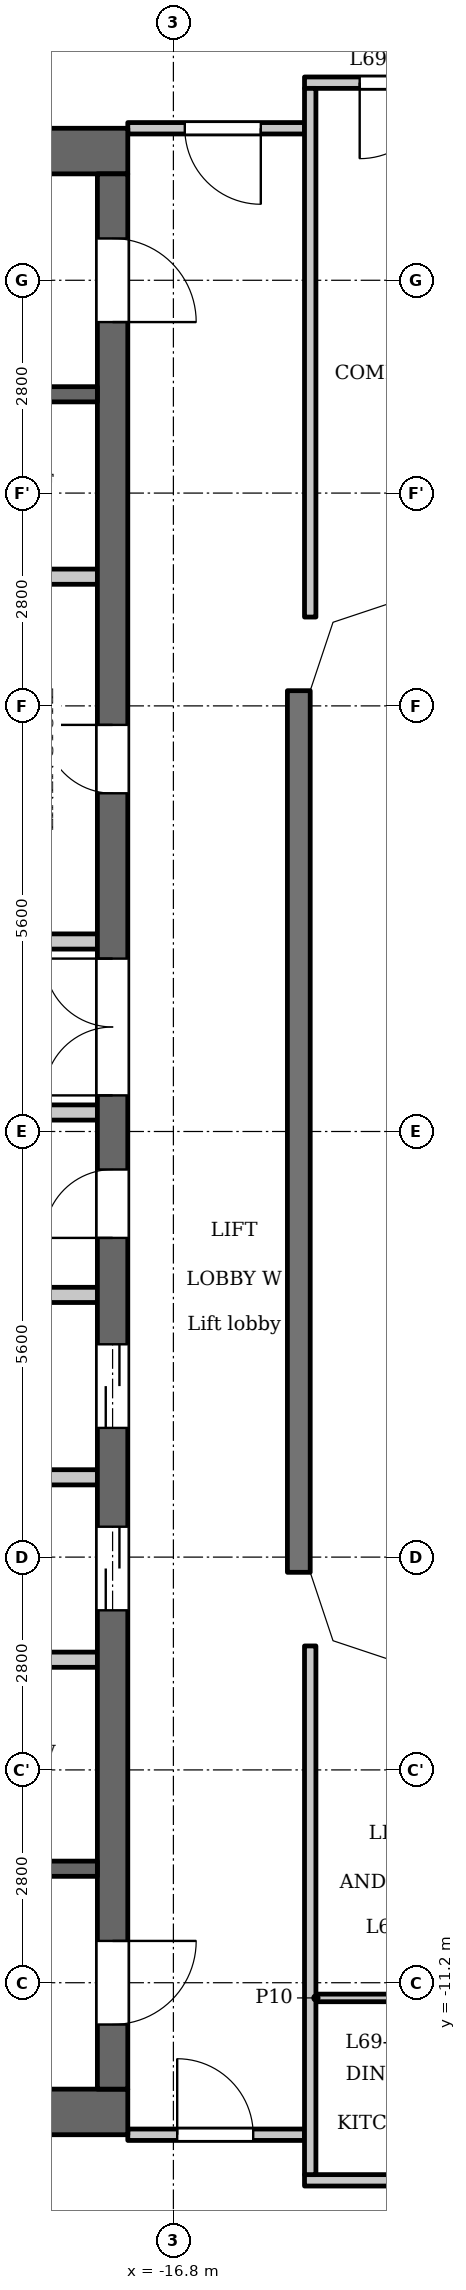
"""IFC4 building model, lengths in metres.
Left out: names, types, materials, properties, quantities, classifications, styles, units other than length and angle.
Written with IfcOpenShell. Run it as: python <this file> out.ifc"""

import sys

from ifc_helpers import new_model, si_unit, direction, frame, frame_2d, origin, place, context, subcontext, project, spatial, polyline, rectangle, outline, extrude, element, fill, save


model = new_model("IFC4")
c1 = context("Model", 3, precision=1e-05, world=origin(), true_north=direction((0.0, 1.0)))
c2 = subcontext(c1, "Body", "Model", "MODEL_VIEW")
j1 = project(units=[si_unit("LENGTHUNIT", "METRE"), si_unit("PLANEANGLEUNIT", "RADIAN")], contexts=[c1])
p1 = place(None, origin())
s1 = spatial("IfcSite", under=j1, at=p1, CompositionType="ELEMENT")
p2 = place(p1, origin())
s2 = spatial("IfcBuilding", under=s1, at=p2, CompositionType="ELEMENT")
p3 = place(p2, frame((0.0, 0.0, 266.2)))
s3 = spatial("IfcBuildingStorey", under=s2, at=p3, CompositionType="ELEMENT", Elevation=266.2)
p4 = place(p3, frame((-15.15, -5.8, 0.0), z_axis=(0.0, 0.0, 1.0), x_axis=(0.0, 1.0, 0.0)))
e1 = element("IfcWall", 1, at=p4, inside=s3, PredefinedType="SOLIDWALL", context=c2, shape_type="SweptSolid", body=[
    extrude(rectangle(XDim=11.6, YDim=0.3, at=frame_2d((5.8, 0.0))), origin(), (0.0, 0.0, 1.0), 3.2),
])
for number, where, z_axis, x_axis in (
    (2, (-17.4, 12.9, 0.0), (0.0, 0.0, 1.0), (-1.0, 0.0, 0.0)),
    (3, (-17.4, -12.9, 0.0), (0.0, 0.0, 1.0), (-1.0, 0.0, 0.0)),
):
    element("IfcWall", number, at=place(p3, frame(where, z_axis=z_axis, x_axis=x_axis)), inside=s3, PredefinedType="SHEAR", context=c2, shape_type="SweptSolid", body=[
        extrude(rectangle(XDim=7.32, YDim=0.6, at=frame_2d((3.66, 0.0))), origin(), (0.0, 0.0, 1.0), 3.2),
    ])
p5 = place(p3, frame((-17.6, -12.6, 0.0), z_axis=(0.0, 0.0, 1.0), x_axis=(0.0, 1.0, 0.0)))
e4 = element("IfcWall", 4, at=p5, inside=s3, PredefinedType="SHEAR", context=c2, shape_type="SweptSolid", body=[
    extrude(rectangle(XDim=25.2, YDim=0.4, at=frame_2d((12.6, 0.0))), origin(), (0.0, 0.0, 1.0), 3.2),
])
p6 = place(p5, frame((6.3, 0.0, 0.0)))
e5 = element("IfcOpeningElement", 5, at=p6, cuts=e4, PredefinedType="OPENING", context=c2, shape_type="SweptSolid", body=[
    extrude(rectangle(XDim=1.1, YDim=2.1, at=frame_2d((0.55, 1.05))), frame((0.0, 0.21, 0.0), z_axis=(0.0, -1.0, 0.0), x_axis=(1.0, 0.0, 0.0)), (0.0, 0.0, 1.0), 0.42),
])
p7 = place(p5, frame((8.7, 0.0, 0.0)))
e6 = element("IfcOpeningElement", 6, at=p7, cuts=e4, PredefinedType="OPENING", context=c2, shape_type="SweptSolid", body=[
    extrude(rectangle(XDim=1.1, YDim=2.1, at=frame_2d((0.55, 1.05))), frame((0.0, 0.21, 0.0), z_axis=(0.0, -1.0, 0.0), x_axis=(1.0, 0.0, 0.0)), (0.0, 0.0, 1.0), 0.42),
])
p8 = place(p5, frame((11.2, 0.0, 0.0)))
e7 = element("IfcOpeningElement", 7, at=p8, cuts=e4, PredefinedType="OPENING", context=c2, shape_type="SweptSolid", body=[
    extrude(rectangle(XDim=0.9, YDim=2.1, at=frame_2d((0.45, 1.05))), frame((0.0, 0.21, 0.0), z_axis=(0.0, -1.0, 0.0), x_axis=(1.0, 0.0, 0.0)), (0.0, 0.0, 1.0), 0.42),
])
p9 = place(p5, frame((17.05, 0.0, 0.0)))
e8 = element("IfcOpeningElement", 8, at=p9, cuts=e4, PredefinedType="OPENING", context=c2, shape_type="SweptSolid", body=[
    extrude(rectangle(XDim=0.9, YDim=2.1, at=frame_2d((0.45, 1.05))), frame((0.0, 0.21, 0.0), z_axis=(0.0, -1.0, 0.0), x_axis=(1.0, 0.0, 0.0)), (0.0, 0.0, 1.0), 0.42),
])
p10 = place(p5, frame((23.25, 0.0, 0.0)))
e9 = element("IfcOpeningElement", 9, at=p10, cuts=e4, PredefinedType="OPENING", context=c2, shape_type="SweptSolid", body=[
    extrude(rectangle(XDim=1.1, YDim=2.1, at=frame_2d((0.55, 1.05))), frame((0.0, 0.21, 0.0), z_axis=(0.0, -1.0, 0.0), x_axis=(1.0, 0.0, 0.0)), (0.0, 0.0, 1.0), 0.42),
])
p11 = place(p5, frame((0.85, 0.0, 0.0)))
e10 = element("IfcOpeningElement", 10, at=p11, cuts=e4, PredefinedType="OPENING", context=c2, shape_type="SweptSolid", body=[
    extrude(rectangle(XDim=1.1, YDim=2.1, at=frame_2d((0.55, 1.05))), frame((0.0, 0.21, 0.0), z_axis=(0.0, -1.0, 0.0), x_axis=(1.0, 0.0, 0.0)), (0.0, 0.0, 1.0), 0.42),
])
p12 = place(p5, frame((13.075, 0.0, 0.0)))
e11 = element("IfcOpeningElement", 11, at=p12, cuts=e4, PredefinedType="OPENING", context=c2, shape_type="SweptSolid", body=[
    extrude(rectangle(XDim=1.8, YDim=2.1, at=frame_2d((0.9, 1.05))), frame((0.0, 0.21, 0.0), z_axis=(0.0, -1.0, 0.0), x_axis=(1.0, 0.0, 0.0)), (0.0, 0.0, 1.0), 0.42),
])
p13 = place(p3, frame((-17.8, -9.7, 0.0), z_axis=(0.0, 0.0, 1.0), x_axis=(-1.0, 0.0, 0.0)))
e12 = element("IfcWall", 12, at=p13, inside=s3, PredefinedType="SHEAR", context=c2, shape_type="SweptSolid", body=[
    extrude(rectangle(XDim=5.8, YDim=0.2, at=frame_2d((2.9, 0.0))), origin(), (0.0, 0.0, 1.0), 3.2),
])
p14 = place(p13, frame((0.85, 0.0, 0.0)))
e13 = element("IfcOpeningElement", 13, at=p14, cuts=e12, PredefinedType="OPENING", context=c2, shape_type="SweptSolid", body=[
    extrude(rectangle(XDim=1.1, YDim=2.1, at=frame_2d((0.55, 1.05))), frame((0.0, 0.11, 0.0), z_axis=(0.0, -1.0, 0.0), x_axis=(1.0, 0.0, 0.0)), (0.0, 0.0, 1.0), 0.22),
])
p15 = place(p13, frame((3.75, 0.0, 0.0)))
e14 = element("IfcOpeningElement", 14, at=p15, cuts=e12, PredefinedType="OPENING", context=c2, shape_type="SweptSolid", body=[
    extrude(rectangle(XDim=1.1, YDim=2.1, at=frame_2d((0.55, 1.05))), frame((0.0, 0.11, 0.0), z_axis=(0.0, -1.0, 0.0), x_axis=(1.0, 0.0, 0.0)), (0.0, 0.0, 1.0), 0.22),
])
for number, where, z_axis, x_axis in (
    (15, (-17.8, -6.95, 0.0), (0.0, 0.0, 1.0), (-1.0, 0.0, 0.0)),
    (16, (-17.8, -4.55, 0.0), (0.0, 0.0, 1.0), (-1.0, 0.0, 0.0)),
    (17, (-17.8, -2.15, 0.0), (0.0, 0.0, 1.0), (-1.0, 0.0, 0.0)),
):
    element("IfcWall", number, at=place(p3, frame(where, z_axis=z_axis, x_axis=x_axis)), inside=s3, PredefinedType="PARTITIONING", context=c2, shape_type="SweptSolid", body=[
        extrude(rectangle(XDim=2.8, YDim=0.2, at=frame_2d((1.4, 0.0))), origin(), (0.0, 0.0, 1.0), 3.2),
    ])
p16 = place(p3, frame((-17.8, 0.25, 0.0), z_axis=(0.0, 0.0, 1.0), x_axis=(-1.0, 0.0, 0.0)))
e18 = element("IfcWall", 18, at=p16, inside=s3, PredefinedType="PARTITIONING", context=c2, shape_type="SweptSolid", body=[
    extrude(rectangle(XDim=3.0, YDim=0.2, at=frame_2d((1.5, 0.0))), origin(), (0.0, 0.0, 1.0), 3.2),
])
p17 = place(p3, frame((-17.8, 2.5, 0.0), z_axis=(0.0, 0.0, 1.0), x_axis=(-1.0, 0.0, 0.0)))
e19 = element("IfcWall", 19, at=p17, inside=s3, PredefinedType="PARTITIONING", context=c2, shape_type="SweptSolid", body=[
    extrude(rectangle(XDim=3.0, YDim=0.2, at=frame_2d((1.5, 0.0))), origin(), (0.0, 0.0, 1.0), 3.2),
])
p18 = place(p17, frame((1.7, 0.0, 0.0)))
e20 = element("IfcOpeningElement", 20, at=p18, cuts=e19, PredefinedType="OPENING", context=c2, shape_type="SweptSolid", body=[
    extrude(rectangle(XDim=0.9, YDim=2.1, at=frame_2d((0.45, 1.05))), frame((0.0, 0.11, 0.0), z_axis=(0.0, -1.0, 0.0), x_axis=(1.0, 0.0, 0.0)), (0.0, 0.0, 1.0), 0.22),
])
p19 = place(p3, frame((-17.8, 7.3, 0.0), z_axis=(0.0, 0.0, 1.0), x_axis=(-1.0, 0.0, 0.0)))
e21 = element("IfcWall", 21, at=p19, inside=s3, PredefinedType="PARTITIONING", context=c2, shape_type="SweptSolid", body=[
    extrude(rectangle(XDim=2.8, YDim=0.2, at=frame_2d((1.4, 0.0))), origin(), (0.0, 0.0, 1.0), 3.2),
])
p20 = place(p3, frame((-17.8, 9.7, 0.0), z_axis=(0.0, 0.0, 1.0), x_axis=(-1.0, 0.0, 0.0)))
e22 = element("IfcWall", 22, at=p20, inside=s3, PredefinedType="SHEAR", context=c2, shape_type="SweptSolid", body=[
    extrude(rectangle(XDim=5.8, YDim=0.2, at=frame_2d((2.9, 0.0))), origin(), (0.0, 0.0, 1.0), 3.2),
])
p21 = place(p20, frame((0.85, 0.0, 0.0)))
e23 = element("IfcOpeningElement", 23, at=p21, cuts=e22, PredefinedType="OPENING", context=c2, shape_type="SweptSolid", body=[
    extrude(rectangle(XDim=1.1, YDim=2.1, at=frame_2d((0.55, 1.05))), frame((0.0, 0.11, 0.0), z_axis=(0.0, -1.0, 0.0), x_axis=(1.0, 0.0, 0.0)), (0.0, 0.0, 1.0), 0.22),
])
p22 = place(p20, frame((3.75, 0.0, 0.0)))
e24 = element("IfcOpeningElement", 24, at=p22, cuts=e22, PredefinedType="OPENING", context=c2, shape_type="SweptSolid", body=[
    extrude(rectangle(XDim=1.1, YDim=2.1, at=frame_2d((0.55, 1.05))), frame((0.0, 0.11, 0.0), z_axis=(0.0, -1.0, 0.0), x_axis=(1.0, 0.0, 0.0)), (0.0, 0.0, 1.0), 0.22),
])
p23 = place(p3, frame((-15.075, -13.8, 0.0), z_axis=(0.0, 0.0, 1.0), x_axis=(1.0, 0.0, 0.0)))
e25 = element("IfcWall", 25, at=p23, inside=s3, PredefinedType="PARTITIONING", context=c2, shape_type="SweptSolid", body=[
    extrude(rectangle(XDim=30.15, YDim=0.15, at=frame_2d((15.075, 0.0))), origin(), (0.0, 0.0, 1.0), 3.2),
])
p24 = place(p23, frame((2.225, 0.0, 0.0)))
e26 = element("IfcOpeningElement", 26, at=p24, cuts=e25, PredefinedType="OPENING", context=c2, shape_type="SweptSolid", body=[
    extrude(rectangle(XDim=1.0, YDim=2.1, at=frame_2d((0.5, 1.05))), frame((0.0, 0.085, 0.0), z_axis=(0.0, -1.0, 0.0), x_axis=(1.0, 0.0, 0.0)), (0.0, 0.0, 1.0), 0.17),
])
p25 = place(p23, frame((10.825, 0.0, 0.0)))
e27 = element("IfcOpeningElement", 27, at=p25, cuts=e25, PredefinedType="OPENING", context=c2, shape_type="SweptSolid", body=[
    extrude(rectangle(XDim=1.0, YDim=2.1, at=frame_2d((0.5, 1.05))), frame((0.0, 0.085, 0.0), z_axis=(0.0, -1.0, 0.0), x_axis=(1.0, 0.0, 0.0)), (0.0, 0.0, 1.0), 0.17),
])
p26 = place(p23, frame((15.775, 0.0, 0.0)))
e28 = element("IfcOpeningElement", 28, at=p26, cuts=e25, PredefinedType="OPENING", context=c2, shape_type="SweptSolid", body=[
    extrude(rectangle(XDim=1.0, YDim=2.1, at=frame_2d((0.5, 1.05))), frame((0.0, 0.085, 0.0), z_axis=(0.0, -1.0, 0.0), x_axis=(1.0, 0.0, 0.0)), (0.0, 0.0, 1.0), 0.17),
])
p27 = place(p3, frame((-17.4, -13.2, 0.0), z_axis=(0.0, 0.0, 1.0), x_axis=(1.0, 0.0, 0.0)))
e29 = element("IfcWall", 29, at=p27, inside=s3, PredefinedType="PARTITIONING", context=c2, shape_type="SweptSolid", body=[
    extrude(rectangle(XDim=2.325, YDim=0.15, at=frame_2d((1.163, 0.0))), origin(), (0.0, 0.0, 1.0), 3.2),
])
p28 = place(p27, frame((0.65, 0.0, 0.0)))
e30 = element("IfcOpeningElement", 30, at=p28, cuts=e29, PredefinedType="OPENING", context=c2, shape_type="SweptSolid", body=[
    extrude(rectangle(XDim=1.0, YDim=2.1, at=frame_2d((0.5, 1.05))), frame((0.0, 0.085, 0.0), z_axis=(0.0, -1.0, 0.0), x_axis=(1.0, 0.0, 0.0)), (0.0, 0.0, 1.0), 0.17),
])
p29 = place(p3, frame((-14.925, -11.4, 0.0), z_axis=(0.0, 0.0, 1.0), x_axis=(1.0, 0.0, 0.0)))
e31 = element("IfcWall", 31, at=p29, inside=s3, PredefinedType="PARTITIONING", context=c2, shape_type="SweptSolid", body=[
    extrude(rectangle(XDim=29.85, YDim=0.1, at=frame_2d((14.925, 0.0))), origin(), (0.0, 0.0, 1.0), 3.2),
])
p30 = place(p29, frame((7.875, 0.0, 0.0)))
e32 = element("IfcOpeningElement", 32, at=p30, cuts=e31, PredefinedType="OPENING", context=c2, shape_type="SweptSolid", body=[
    extrude(rectangle(XDim=0.8, YDim=2.1, at=frame_2d((0.4, 1.05))), frame((0.0, 0.06, 0.0), z_axis=(0.0, -1.0, 0.0), x_axis=(1.0, 0.0, 0.0)), (0.0, 0.0, 1.0), 0.12),
])
p31 = place(p29, frame((1.175, 0.0, 0.0)))
e33 = element("IfcOpeningElement", 33, at=p31, cuts=e31, PredefinedType="OPENING", context=c2, shape_type="SweptSolid", body=[
    extrude(rectangle(XDim=0.9, YDim=2.1, at=frame_2d((0.45, 1.05))), frame((0.0, 0.06, 0.0), z_axis=(0.0, -1.0, 0.0), x_axis=(1.0, 0.0, 0.0)), (0.0, 0.0, 1.0), 0.12),
])
p32 = place(p29, frame((13.475, 0.0, 0.0)))
e34 = element("IfcOpeningElement", 34, at=p32, cuts=e31, PredefinedType="OPENING", context=c2, shape_type="SweptSolid", body=[
    extrude(rectangle(XDim=0.8, YDim=2.1, at=frame_2d((0.4, 1.05))), frame((0.0, 0.06, 0.0), z_axis=(0.0, -1.0, 0.0), x_axis=(1.0, 0.0, 0.0)), (0.0, 0.0, 1.0), 0.12),
])
p33 = place(p29, frame((9.775, 0.0, 0.0)))
e35 = element("IfcOpeningElement", 35, at=p33, cuts=e31, PredefinedType="OPENING", context=c2, shape_type="SweptSolid", body=[
    extrude(rectangle(XDim=0.9, YDim=2.1, at=frame_2d((0.45, 1.05))), frame((0.0, 0.06, 0.0), z_axis=(0.0, -1.0, 0.0), x_axis=(1.0, 0.0, 0.0)), (0.0, 0.0, 1.0), 0.12),
])
p34 = place(p29, frame((16.675, 0.0, 0.0)))
e36 = element("IfcOpeningElement", 36, at=p34, cuts=e31, PredefinedType="OPENING", context=c2, shape_type="SweptSolid", body=[
    extrude(rectangle(XDim=0.9, YDim=2.1, at=frame_2d((0.45, 1.05))), frame((0.0, 0.06, 0.0), z_axis=(0.0, -1.0, 0.0), x_axis=(1.0, 0.0, 0.0)), (0.0, 0.0, 1.0), 0.12),
])
p35 = place(p29, frame((18.225, 0.0, 0.0)))
e37 = element("IfcOpeningElement", 37, at=p35, cuts=e31, PredefinedType="OPENING", context=c2, shape_type="SweptSolid", body=[
    extrude(rectangle(XDim=0.9, YDim=2.1, at=frame_2d((0.45, 1.05))), frame((0.0, 0.06, 0.0), z_axis=(0.0, -1.0, 0.0), x_axis=(1.0, 0.0, 0.0)), (0.0, 0.0, 1.0), 0.12),
])
p36 = place(p29, frame((24.325, 0.0, 0.0)))
e38 = element("IfcOpeningElement", 38, at=p36, cuts=e31, PredefinedType="OPENING", context=c2, shape_type="SweptSolid", body=[
    extrude(rectangle(XDim=0.9, YDim=2.1, at=frame_2d((0.45, 1.05))), frame((0.0, 0.06, 0.0), z_axis=(0.0, -1.0, 0.0), x_axis=(1.0, 0.0, 0.0)), (0.0, 0.0, 1.0), 0.12),
])
p37 = place(p3, frame((-17.4, 13.2, 0.0), z_axis=(0.0, 0.0, 1.0), x_axis=(1.0, 0.0, 0.0)))
e39 = element("IfcWall", 39, at=p37, inside=s3, PredefinedType="PARTITIONING", context=c2, shape_type="SweptSolid", body=[
    extrude(rectangle(XDim=2.325, YDim=0.15, at=frame_2d((1.163, 0.0))), origin(), (0.0, 0.0, 1.0), 3.2),
])
p38 = place(p37, frame((0.75, 0.0, 0.0)))
e40 = element("IfcOpeningElement", 40, at=p38, cuts=e39, PredefinedType="OPENING", context=c2, shape_type="SweptSolid", body=[
    extrude(rectangle(XDim=1.0, YDim=2.1, at=frame_2d((0.5, 1.05))), frame((0.0, 0.085, 0.0), z_axis=(0.0, -1.0, 0.0), x_axis=(1.0, 0.0, 0.0)), (0.0, 0.0, 1.0), 0.17),
])
p39 = place(p3, frame((-15.075, 13.8, 0.0), z_axis=(0.0, 0.0, 1.0), x_axis=(1.0, 0.0, 0.0)))
e41 = element("IfcWall", 41, at=p39, inside=s3, PredefinedType="PARTITIONING", context=c2, shape_type="SweptSolid", body=[
    extrude(rectangle(XDim=30.15, YDim=0.15, at=frame_2d((15.075, 0.0))), origin(), (0.0, 0.0, 1.0), 3.2),
])
p40 = place(p39, frame((0.726, 0.0, 0.0)))
e42 = element("IfcOpeningElement", 42, at=p40, cuts=e41, PredefinedType="OPENING", context=c2, shape_type="SweptSolid", body=[
    extrude(rectangle(XDim=1.0, YDim=2.1, at=frame_2d((0.5, 1.05))), frame((0.0, 0.085, 0.0), z_axis=(0.0, -1.0, 0.0), x_axis=(1.0, 0.0, 0.0)), (0.0, 0.0, 1.0), 0.17),
])
p41 = place(p39, frame((7.775, 0.0, 0.0)))
e43 = element("IfcOpeningElement", 43, at=p41, cuts=e41, PredefinedType="OPENING", context=c2, shape_type="SweptSolid", body=[
    extrude(rectangle(XDim=1.0, YDim=2.1, at=frame_2d((0.5, 1.05))), frame((0.0, 0.085, 0.0), z_axis=(0.0, -1.0, 0.0), x_axis=(1.0, 0.0, 0.0)), (0.0, 0.0, 1.0), 0.17),
])
p42 = place(p39, frame((10.125, 0.0, 0.0)))
e44 = element("IfcOpeningElement", 44, at=p42, cuts=e41, PredefinedType="OPENING", context=c2, shape_type="SweptSolid", body=[
    extrude(rectangle(XDim=1.0, YDim=2.1, at=frame_2d((0.5, 1.05))), frame((0.0, 0.085, 0.0), z_axis=(0.0, -1.0, 0.0), x_axis=(1.0, 0.0, 0.0)), (0.0, 0.0, 1.0), 0.17),
])
p43 = place(p39, frame((18.975, 0.0, 0.0)))
e45 = element("IfcOpeningElement", 45, at=p43, cuts=e41, PredefinedType="OPENING", context=c2, shape_type="SweptSolid", body=[
    extrude(rectangle(XDim=1.0, YDim=2.1, at=frame_2d((0.5, 1.05))), frame((0.0, 0.085, 0.0), z_axis=(0.0, -1.0, 0.0), x_axis=(1.0, 0.0, 0.0)), (0.0, 0.0, 1.0), 0.17),
])
p44 = place(p39, frame((21.325, 0.0, 0.0)))
e46 = element("IfcOpeningElement", 46, at=p44, cuts=e41, PredefinedType="OPENING", context=c2, shape_type="SweptSolid", body=[
    extrude(rectangle(XDim=1.0, YDim=2.1, at=frame_2d((0.5, 1.05))), frame((0.0, 0.085, 0.0), z_axis=(0.0, -1.0, 0.0), x_axis=(1.0, 0.0, 0.0)), (0.0, 0.0, 1.0), 0.17),
])
p45 = place(p39, frame((28.425, 0.0, 0.0)))
e47 = element("IfcOpeningElement", 47, at=p45, cuts=e41, PredefinedType="OPENING", context=c2, shape_type="SweptSolid", body=[
    extrude(rectangle(XDim=1.0, YDim=2.1, at=frame_2d((0.5, 1.05))), frame((0.0, 0.085, 0.0), z_axis=(0.0, -1.0, 0.0), x_axis=(1.0, 0.0, 0.0)), (0.0, 0.0, 1.0), 0.17),
])
for number, where, z_axis, x_axis in (
    (48, (-15.0, -13.725, 0.0), (0.0, 0.0, 1.0), (0.0, 1.0, 0.0)),
    (49, (-15.0, 6.769, 0.0), (0.0, 0.0, 1.0), (0.0, 1.0, 0.0)),
):
    element("IfcWall", number, at=place(p3, frame(where, z_axis=z_axis, x_axis=x_axis)), inside=s3, PredefinedType="PARTITIONING", context=c2, shape_type="SweptSolid", body=[
        extrude(rectangle(XDim=6.956, YDim=0.15, at=frame_2d((3.478, 0.0))), origin(), (0.0, 0.0, 1.0), 3.2),
    ])
p46 = place(p3, origin())
e50 = element("IfcWall", 50, at=p46, inside=s3, PredefinedType="SOLIDWALL", context=c2, shape_type="SweptSolid", body=[
    extrude(outline(polyline([(-13.849, 7.3), (-14.937, 6.937), (-15.3, 5.849), (-15.3, 5.8), (-15.0, 5.8), (-14.7, 6.7), (-13.8, 7.0), (-13.8, 7.3), (-13.849, 7.3)])), origin(), (0.0, 0.0, 1.0), 3.2),
])
e51 = element("IfcWall", 51, at=p46, inside=s3, PredefinedType="SOLIDWALL", context=c2, shape_type="SweptSolid", body=[
    extrude(outline(polyline([(-14.937, -6.937), (-13.849, -7.3), (-13.8, -7.3), (-13.8, -7.0), (-14.7, -6.7), (-15.0, -5.8), (-15.3, -5.8), (-15.3, -5.849), (-14.937, -6.937)])), origin(), (0.0, 0.0, 1.0), 3.2),
])
p47 = place(p6, origin())
e52 = element("IfcDoor", 52, at=p47, inside=s3, OperationType="DOUBLE_DOOR_SLIDING", PredefinedType="DOOR", context=c2, shape_type="SweptSolid", body=[
    extrude(rectangle(XDim=1.1, YDim=2.1, at=frame_2d((0.55, 1.05))), frame((0.0, 0.025, 0.0), z_axis=(0.0, -1.0, 0.0), x_axis=(1.0, 0.0, 0.0)), (0.0, 0.0, 1.0), 0.05),
])
fill(e5, e52)
p48 = place(p7, origin())
e53 = element("IfcDoor", 53, at=p48, inside=s3, OperationType="DOUBLE_DOOR_SLIDING", PredefinedType="DOOR", context=c2, shape_type="SweptSolid", body=[
    extrude(rectangle(XDim=1.1, YDim=2.1, at=frame_2d((0.55, 1.05))), frame((0.0, 0.025, 0.0), z_axis=(0.0, -1.0, 0.0), x_axis=(1.0, 0.0, 0.0)), (0.0, 0.0, 1.0), 0.05),
])
fill(e6, e53)
p49 = place(p8, origin())
e54 = element("IfcDoor", 54, at=p49, inside=s3, OperationType="SINGLE_SWING_RIGHT", PredefinedType="DOOR", context=c2, shape_type="SweptSolid", body=[
    extrude(rectangle(XDim=0.9, YDim=2.1, at=frame_2d((0.45, 1.05))), frame((0.0, 0.025, 0.0), z_axis=(0.0, -1.0, 0.0), x_axis=(1.0, 0.0, 0.0)), (0.0, 0.0, 1.0), 0.05),
])
fill(e7, e54)
p50 = place(p9, origin())
e55 = element("IfcDoor", 55, at=p50, inside=s3, OperationType="SINGLE_SWING_LEFT", PredefinedType="DOOR", context=c2, shape_type="SweptSolid", body=[
    extrude(rectangle(XDim=0.9, YDim=2.1, at=frame_2d((0.45, 1.05))), frame((0.0, 0.025, 0.0), z_axis=(0.0, -1.0, 0.0), x_axis=(1.0, 0.0, 0.0)), (0.0, 0.0, 1.0), 0.05),
])
fill(e8, e55)
p51 = place(p10, origin())
e56 = element("IfcDoor", 56, at=p51, inside=s3, OperationType="SINGLE_SWING_LEFT", PredefinedType="DOOR", context=c2, shape_type="SweptSolid", body=[
    extrude(rectangle(XDim=1.1, YDim=2.1, at=frame_2d((0.55, 1.05))), frame((0.0, 0.025, 0.0), z_axis=(0.0, -1.0, 0.0), x_axis=(1.0, 0.0, 0.0)), (0.0, 0.0, 1.0), 0.05),
])
fill(e9, e56)
p52 = place(p11, origin())
e57 = element("IfcDoor", 57, at=p52, inside=s3, OperationType="SINGLE_SWING_RIGHT", PredefinedType="DOOR", context=c2, shape_type="SweptSolid", body=[
    extrude(rectangle(XDim=1.1, YDim=2.1, at=frame_2d((0.55, 1.05))), frame((0.0, 0.025, 0.0), z_axis=(0.0, -1.0, 0.0), x_axis=(1.0, 0.0, 0.0)), (0.0, 0.0, 1.0), 0.05),
])
fill(e10, e57)
p53 = place(p12, origin())
e58 = element("IfcDoor", 58, at=p53, inside=s3, OperationType="DOUBLE_DOOR_SINGLE_SWING", PredefinedType="DOOR", context=c2, shape_type="SweptSolid", body=[
    extrude(rectangle(XDim=1.8, YDim=2.1, at=frame_2d((0.9, 1.05))), frame((0.0, 0.025, 0.0), z_axis=(0.0, -1.0, 0.0), x_axis=(1.0, 0.0, 0.0)), (0.0, 0.0, 1.0), 0.05),
])
fill(e11, e58)
p54 = place(p38, origin())
e59 = element("IfcDoor", 59, at=p54, inside=s3, OperationType="SINGLE_SWING_RIGHT", PredefinedType="DOOR", context=c2, shape_type="SweptSolid", body=[
    extrude(rectangle(XDim=1.0, YDim=2.1, at=frame_2d((0.5, 1.05))), frame((0.0, 0.025, 0.0), z_axis=(0.0, -1.0, 0.0), x_axis=(1.0, 0.0, 0.0)), (0.0, 0.0, 1.0), 0.05),
])
fill(e40, e59)
p55 = place(p28, origin())
e60 = element("IfcDoor", 60, at=p55, inside=s3, OperationType="SINGLE_SWING_RIGHT", PredefinedType="DOOR", context=c2, shape_type="SweptSolid", body=[
    extrude(rectangle(XDim=1.0, YDim=2.1, at=frame_2d((0.5, 1.05))), frame((0.0, 0.025, 0.0), z_axis=(0.0, -1.0, 0.0), x_axis=(1.0, 0.0, 0.0)), (0.0, 0.0, 1.0), 0.05),
])
fill(e30, e60)
p56 = place(p40, origin())
e61 = element("IfcDoor", 61, at=p56, inside=s3, OperationType="SINGLE_SWING_LEFT", PredefinedType="DOOR", context=c2, shape_type="SweptSolid", body=[
    extrude(rectangle(XDim=1.0, YDim=2.1, at=frame_2d((0.5, 1.05))), frame((0.0, 0.025, 0.0), z_axis=(0.0, -1.0, 0.0), x_axis=(1.0, 0.0, 0.0)), (0.0, 0.0, 1.0), 0.05),
])
fill(e42, e61)
save(model, sys.argv[1])
